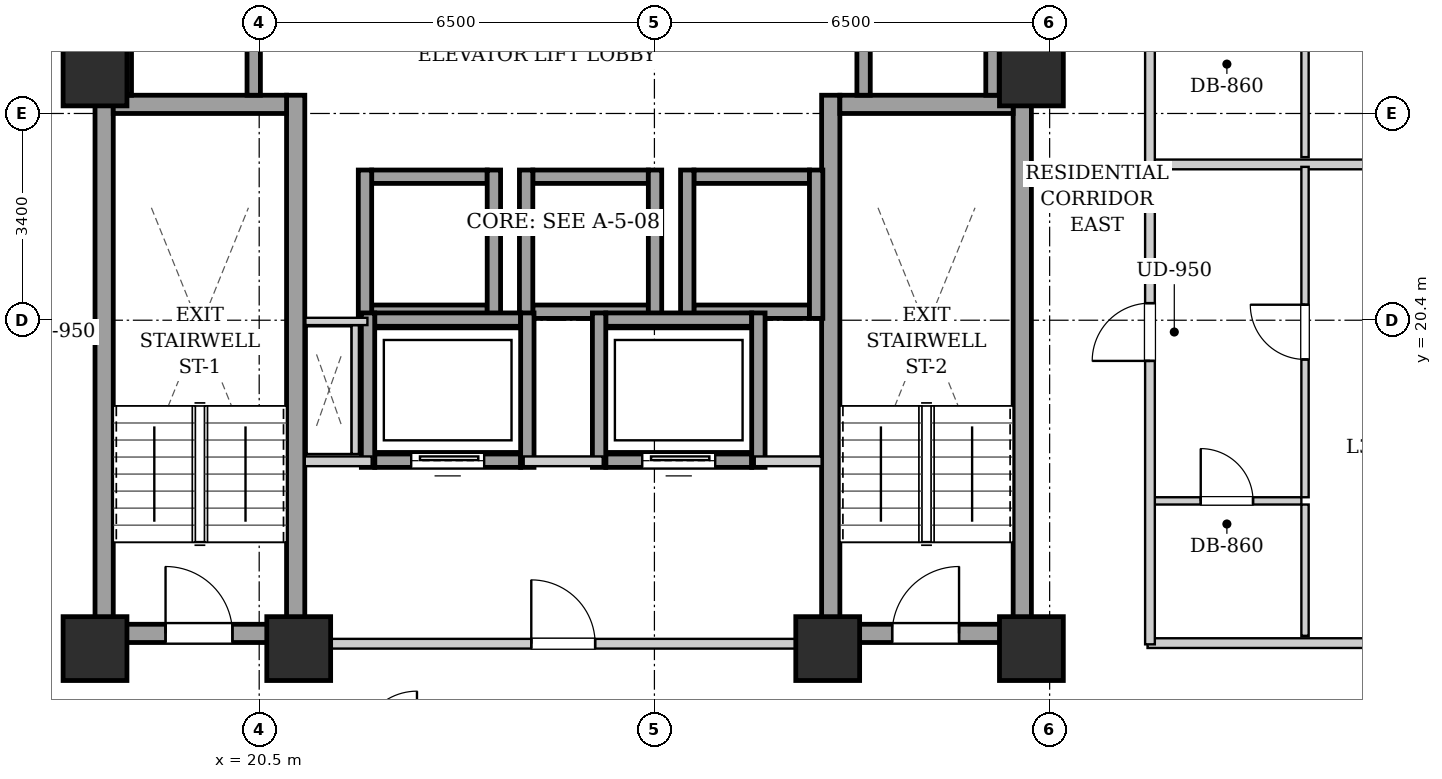
"""IFC4 building model, lengths in metres.
Left out: names, types, materials, properties, quantities, classifications, styles, units other than length and angle.
Written with IfcOpenShell. Run it as: python <this file> out.ifc"""

import sys

from ifc_helpers import new_model, si_unit, direction, frame, frame_2d, origin, origin_2d, place, context, subcontext, project, spatial, rectangle, extrude, element, fill, save


model = new_model("IFC4")
c1 = context("Model", 3, precision=1e-05, world=origin(), true_north=direction((0.0, 1.0)))
c2 = subcontext(c1, "Body", "Model", "MODEL_VIEW")
j1 = project(units=[si_unit("LENGTHUNIT", "METRE"), si_unit("PLANEANGLEUNIT", "RADIAN")], contexts=[c1])
p1 = place(None, origin())
s1 = spatial("IfcSite", under=j1, at=p1, CompositionType="ELEMENT")
p2 = place(p1, origin())
s2 = spatial("IfcBuilding", under=s1, at=p2, CompositionType="ELEMENT")
p3 = place(p2, frame((0.0, 0.0, 110.3)))
s3 = spatial("IfcBuildingStorey", under=s2, at=p3, CompositionType="ELEMENT", Elevation=110.3)
for number, where, z_axis, x_axis in (
    (1, (17.8, 15.0, 0.0), (0.0, 0.0, 1.0), (1.0, 0.0, 0.0)),
    (2, (21.15, 15.0, 0.0), (0.0, 0.0, 1.0), (1.0, 0.0, 0.0)),
    (3, (29.85, 15.0, 0.0), (0.0, 0.0, 1.0), (1.0, 0.0, 0.0)),
    (4, (33.2, 15.0, 0.0), (0.0, 0.0, 1.0), (1.0, 0.0, 0.0)),
    (5, (17.8, 24.45, 0.0), (0.0, 0.0, 1.0), (1.0, 0.0, 0.0)),
    (6, (33.2, 24.45, 0.0), (0.0, 0.0, 1.0), (1.0, 0.0, 0.0)),
):
    element("IfcColumn", number, at=place(p3, frame(where, z_axis=z_axis, x_axis=x_axis)), inside=s3, PredefinedType="COLUMN", context=c2, shape_type="SweptSolid", body=[
        extrude(rectangle(XDim=1.05, YDim=1.05, at=origin_2d()), origin(), (0.0, 0.0, 1.0), 3.2),
    ])
for number, where, z_axis, x_axis in (
    (7, (17.95, 15.1, 0.0), (0.0, 0.0, 1.0), (0.0, 1.0, 0.0)),
    (8, (21.1, 15.1, 0.0), (0.0, 0.0, 1.0), (0.0, 1.0, 0.0)),
):
    element("IfcWall", number, at=place(p3, frame(where, z_axis=z_axis, x_axis=x_axis)), inside=s3, PredefinedType="SHEAR", context=c2, shape_type="SweptSolid", body=[
        extrude(rectangle(XDim=9.0, YDim=0.3, at=frame_2d((4.5, 0.0))), origin(), (0.0, 0.0, 1.0), 2.94),
    ])
p4 = place(p3, frame((18.1, 23.95, 0.0), z_axis=(0.0, 0.0, 1.0), x_axis=(1.0, 0.0, 0.0)))
e9 = element("IfcWall", 9, at=p4, inside=s3, PredefinedType="SHEAR", context=c2, shape_type="SweptSolid", body=[
    extrude(rectangle(XDim=2.85, YDim=0.3, at=frame_2d((1.425, 0.0))), origin(), (0.0, 0.0, 1.0), 2.94),
])
p5 = place(p3, frame((18.1, 15.25, 0.0), z_axis=(0.0, 0.0, 1.0), x_axis=(1.0, 0.0, 0.0)))
e10 = element("IfcWall", 10, at=p5, inside=s3, PredefinedType="SHEAR", context=c2, shape_type="SweptSolid", body=[
    extrude(rectangle(XDim=2.85, YDim=0.3, at=frame_2d((1.425, 0.0))), origin(), (0.0, 0.0, 1.0), 2.94),
])
p6 = place(p5, frame((0.86, 0.0, 0.0)))
e11 = element("IfcOpeningElement", 11, at=p6, cuts=e10, PredefinedType="OPENING", context=c2, shape_type="SweptSolid", body=[
    extrude(rectangle(XDim=1.1, YDim=2.05, at=frame_2d((0.55, 1.025))), frame((0.0, 0.16, 0.0), z_axis=(0.0, -1.0, 0.0), x_axis=(1.0, 0.0, 0.0)), (0.0, 0.0, 1.0), 0.32),
])
for number, where, z_axis, x_axis in (
    (12, (29.9, 15.1, 0.0), (0.0, 0.0, 1.0), (0.0, 1.0, 0.0)),
    (13, (33.05, 15.1, 0.0), (0.0, 0.0, 1.0), (0.0, 1.0, 0.0)),
):
    element("IfcWall", number, at=place(p3, frame(where, z_axis=z_axis, x_axis=x_axis)), inside=s3, PredefinedType="SHEAR", context=c2, shape_type="SweptSolid", body=[
        extrude(rectangle(XDim=9.0, YDim=0.3, at=frame_2d((4.5, 0.0))), origin(), (0.0, 0.0, 1.0), 2.94),
    ])
p7 = place(p3, frame((30.05, 23.95, 0.0), z_axis=(0.0, 0.0, 1.0), x_axis=(1.0, 0.0, 0.0)))
e14 = element("IfcWall", 14, at=p7, inside=s3, PredefinedType="SHEAR", context=c2, shape_type="SweptSolid", body=[
    extrude(rectangle(XDim=2.85, YDim=0.3, at=frame_2d((1.425, 0.0))), origin(), (0.0, 0.0, 1.0), 2.94),
])
p8 = place(p3, frame((30.05, 15.25, 0.0), z_axis=(0.0, 0.0, 1.0), x_axis=(1.0, 0.0, 0.0)))
e15 = element("IfcWall", 15, at=p8, inside=s3, PredefinedType="SHEAR", context=c2, shape_type="SweptSolid", body=[
    extrude(rectangle(XDim=2.85, YDim=0.3, at=frame_2d((1.425, 0.0))), origin(), (0.0, 0.0, 1.0), 2.94),
])
p9 = place(p8, frame((0.86, 0.0, 0.0)))
e16 = element("IfcOpeningElement", 16, at=p9, cuts=e15, PredefinedType="OPENING", context=c2, shape_type="SweptSolid", body=[
    extrude(rectangle(XDim=1.1, YDim=2.05, at=frame_2d((0.55, 1.025))), frame((0.0, 0.16, 0.0), z_axis=(0.0, -1.0, 0.0), x_axis=(1.0, 0.0, 0.0)), (0.0, 0.0, 1.0), 0.32),
])
for number, where, z_axis, x_axis in (
    (17, (22.35, 20.54, 0.0), (0.0, 0.0, 1.0), (1.0, 0.0, 0.0)),
    (18, (22.35, 22.76, 0.0), (0.0, 0.0, 1.0), (1.0, 0.0, 0.0)),
):
    element("IfcWall", number, at=place(p3, frame(where, z_axis=z_axis, x_axis=x_axis)), inside=s3, PredefinedType="SHEAR", context=c2, shape_type="SweptSolid", body=[
        extrude(rectangle(XDim=1.9, YDim=0.22, at=frame_2d((0.95, 0.0))), origin(), (0.0, 0.0, 1.0), 2.94),
    ])
for number, where, z_axis, x_axis in (
    (19, (22.24, 20.43, 0.0), (0.0, 0.0, 1.0), (0.0, 1.0, 0.0)),
    (20, (24.36, 20.43, 0.0), (0.0, 0.0, 1.0), (0.0, 1.0, 0.0)),
):
    element("IfcWall", number, at=place(p3, frame(where, z_axis=z_axis, x_axis=x_axis)), inside=s3, PredefinedType="SHEAR", context=c2, shape_type="SweptSolid", body=[
        extrude(rectangle(XDim=2.44, YDim=0.22, at=frame_2d((1.22, 0.0))), origin(), (0.0, 0.0, 1.0), 2.94),
    ])
for number, where, z_axis, x_axis in (
    (21, (25.0, 20.54, 0.0), (0.0, 0.0, 1.0), (1.0, 0.0, 0.0)),
    (22, (25.0, 22.76, 0.0), (0.0, 0.0, 1.0), (1.0, 0.0, 0.0)),
):
    element("IfcWall", number, at=place(p3, frame(where, z_axis=z_axis, x_axis=x_axis)), inside=s3, PredefinedType="SHEAR", context=c2, shape_type="SweptSolid", body=[
        extrude(rectangle(XDim=1.9, YDim=0.22, at=frame_2d((0.95, 0.0))), origin(), (0.0, 0.0, 1.0), 2.94),
    ])
for number, where, z_axis, x_axis in (
    (23, (24.89, 20.43, 0.0), (0.0, 0.0, 1.0), (0.0, 1.0, 0.0)),
    (24, (27.01, 20.43, 0.0), (0.0, 0.0, 1.0), (0.0, 1.0, 0.0)),
):
    element("IfcWall", number, at=place(p3, frame(where, z_axis=z_axis, x_axis=x_axis)), inside=s3, PredefinedType="SHEAR", context=c2, shape_type="SweptSolid", body=[
        extrude(rectangle(XDim=2.44, YDim=0.22, at=frame_2d((1.22, 0.0))), origin(), (0.0, 0.0, 1.0), 2.94),
    ])
for number, where, z_axis, x_axis in (
    (25, (27.65, 20.54, 0.0), (0.0, 0.0, 1.0), (1.0, 0.0, 0.0)),
    (26, (27.65, 22.76, 0.0), (0.0, 0.0, 1.0), (1.0, 0.0, 0.0)),
):
    element("IfcWall", number, at=place(p3, frame(where, z_axis=z_axis, x_axis=x_axis)), inside=s3, PredefinedType="SHEAR", context=c2, shape_type="SweptSolid", body=[
        extrude(rectangle(XDim=1.9, YDim=0.22, at=frame_2d((0.95, 0.0))), origin(), (0.0, 0.0, 1.0), 2.94),
    ])
for number, where, z_axis, x_axis in (
    (27, (27.54, 20.43, 0.0), (0.0, 0.0, 1.0), (0.0, 1.0, 0.0)),
    (28, (29.66, 20.43, 0.0), (0.0, 0.0, 1.0), (0.0, 1.0, 0.0)),
):
    element("IfcWall", number, at=place(p3, frame(where, z_axis=z_axis, x_axis=x_axis)), inside=s3, PredefinedType="SHEAR", context=c2, shape_type="SweptSolid", body=[
        extrude(rectangle(XDim=2.44, YDim=0.22, at=frame_2d((1.22, 0.0))), origin(), (0.0, 0.0, 1.0), 2.94),
    ])
p10 = place(p3, frame((18.29, 24.1, 0.0), z_axis=(0.0, 0.0, 1.0), x_axis=(0.0, 1.0, 0.0)))
e29 = element("IfcWall", 29, at=p10, inside=s3, PredefinedType="SHEAR", context=c2, shape_type="SweptSolid", body=[
    extrude(rectangle(XDim=4.14, YDim=0.22, at=frame_2d((2.07, 0.0))), origin(), (0.0, 0.0, 1.0), 2.94),
])
p11 = place(p3, frame((20.41, 24.1, 0.0), z_axis=(0.0, 0.0, 1.0), x_axis=(0.0, 1.0, 0.0)))
e30 = element("IfcWall", 30, at=p11, inside=s3, PredefinedType="SHEAR", context=c2, shape_type="SweptSolid", body=[
    extrude(rectangle(XDim=1.96, YDim=0.22, at=frame_2d((0.98, 0.0))), origin(), (0.0, 0.0, 1.0), 2.94),
])
for number, where, z_axis, x_axis in (
    (31, (30.44, 24.1, 0.0), (0.0, 0.0, 1.0), (0.0, 1.0, 0.0)),
    (32, (32.56, 24.1, 0.0), (0.0, 0.0, 1.0), (0.0, 1.0, 0.0)),
):
    element("IfcWall", number, at=place(p3, frame(where, z_axis=z_axis, x_axis=x_axis)), inside=s3, PredefinedType="SHEAR", context=c2, shape_type="SweptSolid", body=[
        extrude(rectangle(XDim=2.07, YDim=0.22, at=frame_2d((1.035, 0.0))), origin(), (0.0, 0.0, 1.0), 2.94),
    ])
p12 = place(p3, frame((22.4, 18.09, 0.0), z_axis=(0.0, 0.0, 1.0), x_axis=(1.0, 0.0, 0.0)))
e33 = element("IfcWall", 33, at=p12, inside=s3, PredefinedType="SHEAR", context=c2, shape_type="SweptSolid", body=[
    extrude(rectangle(XDim=2.4, YDim=0.22, at=frame_2d((1.2, 0.0))), origin(), (0.0, 0.0, 1.0), 2.94),
])
p13 = place(p12, frame((0.6, 0.0, 0.0)))
e34 = element("IfcOpeningElement", 34, at=p13, cuts=e33, PredefinedType="OPENING", context=c2, shape_type="SweptSolid", body=[
    extrude(rectangle(XDim=1.2, YDim=2.15, at=frame_2d((0.6, 1.075))), frame((0.0, 0.12, 0.0), z_axis=(0.0, -1.0, 0.0), x_axis=(1.0, 0.0, 0.0)), (0.0, 0.0, 1.0), 0.24),
])
p14 = place(p3, frame((22.4, 20.41, 0.0), z_axis=(0.0, 0.0, 1.0), x_axis=(1.0, 0.0, 0.0)))
e35 = element("IfcWall", 35, at=p14, inside=s3, PredefinedType="SHEAR", context=c2, shape_type="SweptSolid", body=[
    extrude(rectangle(XDim=2.4, YDim=0.22, at=frame_2d((1.2, 0.0))), origin(), (0.0, 0.0, 1.0), 2.94),
])
for number, where, z_axis, x_axis in (
    (36, (22.29, 17.98, 0.0), (0.0, 0.0, 1.0), (0.0, 1.0, 0.0)),
    (37, (24.91, 17.98, 0.0), (0.0, 0.0, 1.0), (0.0, 1.0, 0.0)),
):
    element("IfcWall", number, at=place(p3, frame(where, z_axis=z_axis, x_axis=x_axis)), inside=s3, PredefinedType="SHEAR", context=c2, shape_type="SweptSolid", body=[
        extrude(rectangle(XDim=2.54, YDim=0.22, at=frame_2d((1.27, 0.0))), origin(), (0.0, 0.0, 1.0), 2.94),
    ])
p15 = place(p3, frame((26.2, 18.09, 0.0), z_axis=(0.0, 0.0, 1.0), x_axis=(1.0, 0.0, 0.0)))
e38 = element("IfcWall", 38, at=p15, inside=s3, PredefinedType="SHEAR", context=c2, shape_type="SweptSolid", body=[
    extrude(rectangle(XDim=2.4, YDim=0.22, at=frame_2d((1.2, 0.0))), origin(), (0.0, 0.0, 1.0), 2.94),
])
p16 = place(p15, frame((0.6, 0.0, 0.0)))
e39 = element("IfcOpeningElement", 39, at=p16, cuts=e38, PredefinedType="OPENING", context=c2, shape_type="SweptSolid", body=[
    extrude(rectangle(XDim=1.2, YDim=2.15, at=frame_2d((0.6, 1.075))), frame((0.0, 0.12, 0.0), z_axis=(0.0, -1.0, 0.0), x_axis=(1.0, 0.0, 0.0)), (0.0, 0.0, 1.0), 0.24),
])
p17 = place(p3, frame((26.2, 20.41, 0.0), z_axis=(0.0, 0.0, 1.0), x_axis=(1.0, 0.0, 0.0)))
e40 = element("IfcWall", 40, at=p17, inside=s3, PredefinedType="SHEAR", context=c2, shape_type="SweptSolid", body=[
    extrude(rectangle(XDim=2.4, YDim=0.22, at=frame_2d((1.2, 0.0))), origin(), (0.0, 0.0, 1.0), 2.94),
])
for number, where, z_axis, x_axis in (
    (41, (26.09, 17.98, 0.0), (0.0, 0.0, 1.0), (0.0, 1.0, 0.0)),
    (42, (28.71, 17.98, 0.0), (0.0, 0.0, 1.0), (0.0, 1.0, 0.0)),
):
    element("IfcWall", number, at=place(p3, frame(where, z_axis=z_axis, x_axis=x_axis)), inside=s3, PredefinedType="SHEAR", context=c2, shape_type="SweptSolid", body=[
        extrude(rectangle(XDim=2.54, YDim=0.22, at=frame_2d((1.27, 0.0))), origin(), (0.0, 0.0, 1.0), 2.94),
    ])
p18 = place(p3, frame((21.25, 15.08, 0.0), z_axis=(0.0, 0.0, 1.0), x_axis=(1.0, 0.0, 0.0)))
e43 = element("IfcWall", 43, at=p18, inside=s3, PredefinedType="PARTITIONING", context=c2, shape_type="SweptSolid", body=[
    extrude(rectangle(XDim=8.5, YDim=0.16, at=frame_2d((4.25, 0.0))), origin(), (0.0, 0.0, 1.0), 2.313),
])
p19 = place(p18, frame((3.725, 0.0, 0.0)))
e44 = element("IfcOpeningElement", 44, at=p19, cuts=e43, PredefinedType="OPENING", context=c2, shape_type="SweptSolid", body=[
    extrude(rectangle(XDim=1.05, YDim=2.05, at=frame_2d((0.525, 1.025))), frame((0.0, 0.09, 0.0), z_axis=(0.0, -1.0, 0.0), x_axis=(1.0, 0.0, 0.0)), (0.0, 0.0, 1.0), 0.18),
])
p20 = place(p3, frame((21.25, 18.08, 0.0), z_axis=(0.0, 0.0, 1.0), x_axis=(1.0, 0.0, 0.0)))
e45 = element("IfcWall", 45, at=p20, inside=s3, PredefinedType="PARTITIONING", context=c2, shape_type="SweptSolid", body=[
    extrude(rectangle(XDim=1.1, YDim=0.16, at=frame_2d((0.55, 0.0))), origin(), (0.0, 0.0, 1.0), 2.94),
])
p21 = place(p3, frame((24.85, 18.08, 0.0), z_axis=(0.0, 0.0, 1.0), x_axis=(1.0, 0.0, 0.0)))
e46 = element("IfcWall", 46, at=p21, inside=s3, PredefinedType="PARTITIONING", context=c2, shape_type="SweptSolid", body=[
    extrude(rectangle(XDim=1.3, YDim=0.16, at=frame_2d((0.65, 0.0))), origin(), (0.0, 0.0, 1.0), 2.94),
])
p22 = place(p3, frame((28.65, 18.08, 0.0), z_axis=(0.0, 0.0, 1.0), x_axis=(1.0, 0.0, 0.0)))
e47 = element("IfcWall", 47, at=p22, inside=s3, PredefinedType="PARTITIONING", context=c2, shape_type="SweptSolid", body=[
    extrude(rectangle(XDim=1.1, YDim=0.16, at=frame_2d((0.55, 0.0))), origin(), (0.0, 0.0, 1.0), 2.94),
])
for number, where, z_axis, x_axis in (
    (48, (17.88, 24.12, 0.0), (0.0, 0.0, 1.0), (0.0, 1.0, 0.0)),
    (49, (33.12, 24.12, 0.0), (0.0, 0.0, 1.0), (0.0, 1.0, 0.0)),
):
    element("IfcWall", number, at=place(p3, frame(where, z_axis=z_axis, x_axis=x_axis)), inside=s3, PredefinedType="PARTITIONING", context=c2, shape_type="SweptSolid", body=[
        extrude(rectangle(XDim=4.76, YDim=0.16, at=frame_2d((2.38, 0.0))), origin(), (0.0, 0.0, 1.0), 2.94),
    ])
p23 = place(p3, frame((22.08, 18.2, 0.0), z_axis=(0.0, 0.0, 1.0), x_axis=(0.0, 1.0, 0.0)))
e50 = element("IfcWall", 50, at=p23, inside=s3, PredefinedType="PARTITIONING", context=c2, shape_type="SweptSolid", body=[
    extrude(rectangle(XDim=2.12, YDim=0.12, at=frame_2d((1.06, 0.0))), origin(), (0.0, 0.0, 1.0), 2.94),
])
p24 = place(p3, frame((22.28, 20.38, 0.0), z_axis=(0.0, 0.0, 1.0), x_axis=(-1.0, 0.0, 0.0)))
e51 = element("IfcWall", 51, at=p24, inside=s3, PredefinedType="PARTITIONING", context=c2, shape_type="SweptSolid", body=[
    extrude(rectangle(XDim=1.02, YDim=0.12, at=frame_2d((0.51, 0.0))), origin(), (0.0, 0.0, 1.0), 2.94),
])
p25 = place(p3, frame((35.11, 15.09, 0.0), z_axis=(0.0, 0.0, 1.0), x_axis=(1.0, 0.0, 0.0)))
e52 = element("IfcWall", 52, at=p25, inside=s3, PredefinedType="PARTITIONING", context=c2, shape_type="SweptSolid", body=[
    extrude(rectangle(XDim=8.01, YDim=0.16, at=frame_2d((4.005, 0.0))), origin(), (0.0, 0.0, 1.0), 2.313),
])
p26 = place(p3, frame((35.19, 22.962, 0.0), z_axis=(0.0, 0.0, 1.0), x_axis=(1.0, 0.0, 0.0)))
e53 = element("IfcWall", 53, at=p26, inside=s3, PredefinedType="PARTITIONING", context=c2, shape_type="SweptSolid", body=[
    extrude(rectangle(XDim=7.93, YDim=0.16, at=frame_2d((3.965, 0.0))), origin(), (0.0, 0.0, 1.0), 2.94),
])
p27 = place(p3, frame((35.19, 17.429, 0.0), z_axis=(0.0, 0.0, 1.0), x_axis=(1.0, 0.0, 0.0)))
e54 = element("IfcWall", 54, at=p27, inside=s3, PredefinedType="PARTITIONING", context=c2, shape_type="SweptSolid", body=[
    extrude(rectangle(XDim=2.45, YDim=0.12, at=frame_2d((1.225, 0.0))), origin(), (0.0, 0.0, 1.0), 2.94),
])
p28 = place(p27, frame((0.795, 0.0, 0.0)))
e55 = element("IfcOpeningElement", 55, at=p28, cuts=e54, PredefinedType="OPENING", context=c2, shape_type="SweptSolid", body=[
    extrude(rectangle(XDim=0.86, YDim=2.05, at=frame_2d((0.43, 1.025))), frame((0.0, 0.07, 0.0), z_axis=(0.0, -1.0, 0.0), x_axis=(1.0, 0.0, 0.0)), (0.0, 0.0, 1.0), 0.14),
])
p29 = place(p3, frame((37.7, 15.21, 0.0), z_axis=(0.0, 0.0, 1.0), x_axis=(0.0, 1.0, 0.0)))
e56 = element("IfcWall", 56, at=p29, inside=s3, PredefinedType="PARTITIONING", context=c2, shape_type="SweptSolid", body=[
    extrude(rectangle(XDim=2.159, YDim=0.12, at=frame_2d((1.08, 0.0))), origin(), (0.0, 0.0, 1.0), 2.94),
])
p30 = place(p3, frame((37.7, 17.489, 0.0), z_axis=(0.0, 0.0, 1.0), x_axis=(0.0, 1.0, 0.0)))
e57 = element("IfcWall", 57, at=p30, inside=s3, PredefinedType="PARTITIONING", context=c2, shape_type="SweptSolid", body=[
    extrude(rectangle(XDim=5.433, YDim=0.12, at=frame_2d((2.717, 0.0))), origin(), (0.0, 0.0, 1.0), 2.94),
])
p31 = place(p30, frame((2.266, 0.0, 0.0)))
e58 = element("IfcOpeningElement", 58, at=p31, cuts=e57, PredefinedType="OPENING", context=c2, shape_type="SweptSolid", body=[
    extrude(rectangle(XDim=0.9, YDim=2.05, at=frame_2d((0.45, 1.025))), frame((0.0, 0.07, 0.0), z_axis=(0.0, -1.0, 0.0), x_axis=(1.0, 0.0, 0.0)), (0.0, 0.0, 1.0), 0.14),
])
p32 = place(p3, frame((37.7, 23.082, 0.0), z_axis=(0.0, 0.0, 1.0), x_axis=(0.0, 1.0, 0.0)))
e59 = element("IfcWall", 59, at=p32, inside=s3, PredefinedType="PARTITIONING", context=c2, shape_type="SweptSolid", body=[
    extrude(rectangle(XDim=1.85, YDim=0.12, at=frame_2d((0.925, 0.0))), origin(), (0.0, 0.0, 1.0), 2.94),
])
p33 = place(p3, frame((35.15, 15.07, 0.0), z_axis=(0.0, 0.0, 1.0), x_axis=(0.0, 1.0, 0.0)))
e60 = element("IfcWall", 60, at=p33, inside=s3, PredefinedType="PARTITIONING", context=c2, shape_type="SweptSolid", body=[
    extrude(rectangle(XDim=13.93, YDim=0.16, at=frame_2d((6.965, 0.0))), origin(), (0.0, 0.0, 1.0), 2.94),
])
p34 = place(p33, frame((4.661, 0.0, 0.0)))
e61 = element("IfcOpeningElement", 61, at=p34, cuts=e60, PredefinedType="OPENING", context=c2, shape_type="SweptSolid", body=[
    extrude(rectangle(XDim=0.95, YDim=2.1, at=frame_2d((0.475, 1.05))), frame((0.0, 0.09, 0.0), z_axis=(0.0, -1.0, 0.0), x_axis=(1.0, 0.0, 0.0)), (0.0, 0.0, 1.0), 0.18),
])
p35 = place(p33, frame((11.411, 0.0, 0.0)))
e62 = element("IfcOpeningElement", 62, at=p35, cuts=e60, PredefinedType="OPENING", context=c2, shape_type="SweptSolid", body=[
    extrude(rectangle(XDim=0.95, YDim=2.1, at=frame_2d((0.475, 1.05))), frame((0.0, 0.09, 0.0), z_axis=(0.0, -1.0, 0.0), x_axis=(1.0, 0.0, 0.0)), (0.0, 0.0, 1.0), 0.18),
])
p36 = place(p6, origin())
e63 = element("IfcDoor", 63, at=p36, inside=s3, OperationType="SINGLE_SWING_LEFT", PredefinedType="DOOR", context=c2, shape_type="SweptSolid", body=[
    extrude(rectangle(XDim=1.1, YDim=2.05, at=frame_2d((0.55, 1.025))), frame((0.0, 0.025, 0.0), z_axis=(0.0, -1.0, 0.0), x_axis=(1.0, 0.0, 0.0)), (0.0, 0.0, 1.0), 0.05),
])
fill(e11, e63)
p37 = place(p9, origin())
e64 = element("IfcDoor", 64, at=p37, inside=s3, OperationType="SINGLE_SWING_RIGHT", PredefinedType="DOOR", context=c2, shape_type="SweptSolid", body=[
    extrude(rectangle(XDim=1.1, YDim=2.05, at=frame_2d((0.55, 1.025))), frame((0.0, 0.025, 0.0), z_axis=(0.0, -1.0, 0.0), x_axis=(1.0, 0.0, 0.0)), (0.0, 0.0, 1.0), 0.05),
])
fill(e16, e64)
p38 = place(p13, origin())
e65 = element("IfcDoor", 65, at=p38, inside=s3, OperationType="SLIDING_TO_LEFT", PredefinedType="DOOR", context=c2, shape_type="SweptSolid", body=[
    extrude(rectangle(XDim=1.2, YDim=2.15, at=frame_2d((0.6, 1.075))), frame((0.0, 0.025, 0.0), z_axis=(0.0, -1.0, 0.0), x_axis=(1.0, 0.0, 0.0)), (0.0, 0.0, 1.0), 0.05),
])
fill(e34, e65)
p39 = place(p16, origin())
e66 = element("IfcDoor", 66, at=p39, inside=s3, OperationType="SLIDING_TO_LEFT", PredefinedType="DOOR", context=c2, shape_type="SweptSolid", body=[
    extrude(rectangle(XDim=1.2, YDim=2.15, at=frame_2d((0.6, 1.075))), frame((0.0, 0.025, 0.0), z_axis=(0.0, -1.0, 0.0), x_axis=(1.0, 0.0, 0.0)), (0.0, 0.0, 1.0), 0.05),
])
fill(e39, e66)
p40 = place(p19, origin())
e67 = element("IfcDoor", 67, at=p40, inside=s3, OperationType="SINGLE_SWING_LEFT", PredefinedType="DOOR", context=c2, shape_type="SweptSolid", body=[
    extrude(rectangle(XDim=1.05, YDim=2.05, at=frame_2d((0.525, 1.025))), frame((0.0, 0.025, 0.0), z_axis=(0.0, -1.0, 0.0), x_axis=(1.0, 0.0, 0.0)), (0.0, 0.0, 1.0), 0.05),
])
fill(e44, e67)
p41 = place(p28, origin())
e68 = element("IfcDoor", 68, at=p41, inside=s3, OperationType="SINGLE_SWING_LEFT", PredefinedType="DOOR", context=c2, shape_type="SweptSolid", body=[
    extrude(rectangle(XDim=0.86, YDim=2.05, at=frame_2d((0.43, 1.025))), frame((0.0, 0.025, 0.0), z_axis=(0.0, -1.0, 0.0), x_axis=(1.0, 0.0, 0.0)), (0.0, 0.0, 1.0), 0.05),
])
fill(e55, e68)
p42 = place(p31, origin())
e69 = element("IfcDoor", 69, at=p42, inside=s3, OperationType="SINGLE_SWING_RIGHT", PredefinedType="DOOR", context=c2, shape_type="SweptSolid", body=[
    extrude(rectangle(XDim=0.9, YDim=2.05, at=frame_2d((0.45, 1.025))), frame((0.0, 0.025, 0.0), z_axis=(0.0, -1.0, 0.0), x_axis=(1.0, 0.0, 0.0)), (0.0, 0.0, 1.0), 0.05),
])
fill(e58, e69)
p43 = place(p34, origin())
e70 = element("IfcDoor", 70, at=p43, inside=s3, OperationType="SINGLE_SWING_LEFT", PredefinedType="DOOR", context=c2, shape_type="SweptSolid", body=[
    extrude(rectangle(XDim=0.95, YDim=2.1, at=frame_2d((0.475, 1.05))), frame((0.0, 0.025, 0.0), z_axis=(0.0, -1.0, 0.0), x_axis=(1.0, 0.0, 0.0)), (0.0, 0.0, 1.0), 0.05),
])
fill(e61, e70)
save(model, sys.argv[1])
